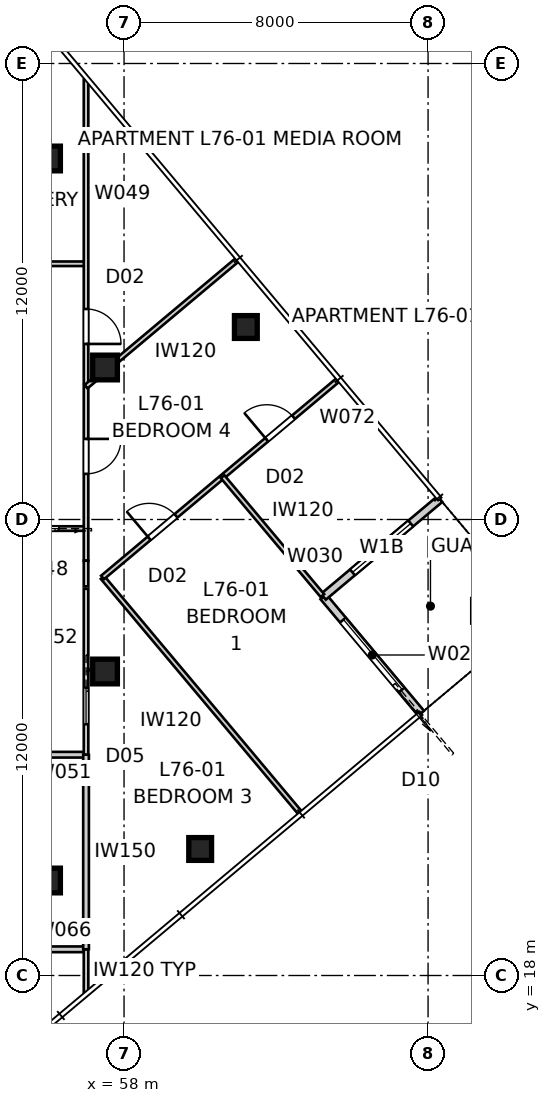
"""IFC4 building model, lengths in metres.
Left out: names, types, materials, properties, quantities, classifications, styles, units other than length and angle.
Written with IfcOpenShell. Run it as: python <this file> out.ifc"""

import sys

from ifc_helpers import new_model, si_unit, direction, frame, frame_2d, origin, origin_2d, place, context, subcontext, project, spatial, rectangle, extrude, element, fill, save


model = new_model("IFC4")
c1 = context("Model", 3, precision=1e-05, world=origin(), true_north=direction((0.0, 1.0)))
c2 = subcontext(c1, "Body", "Model", "MODEL_VIEW")
j1 = project(units=[si_unit("LENGTHUNIT", "METRE"), si_unit("PLANEANGLEUNIT", "RADIAN")], contexts=[c1])
p1 = place(None, origin())
s1 = spatial("IfcSite", under=j1, at=p1, CompositionType="ELEMENT")
p2 = place(p1, origin())
s2 = spatial("IfcBuilding", under=s1, at=p2, CompositionType="ELEMENT")
p3 = place(p2, frame((0.0, 0.0, 276.0)))
s3 = spatial("IfcBuildingStorey", under=s2, at=p3, CompositionType="ELEMENT", Elevation=276.0)
for number, where, z_axis, x_axis in (
    (1, (60.003, 21.329, 0.0), (0.0, 0.0, 1.0), (1.0, 0.0, 0.0)),
    (2, (61.205, 35.065, 0.0), (0.0, 0.0, 1.0), (1.0, 0.0, 0.0)),
):
    element("IfcColumn", number, at=place(p3, frame(where, z_axis=z_axis, x_axis=x_axis)), inside=s3, PredefinedType="COLUMN", context=c2, shape_type="SweptSolid", body=[
        extrude(rectangle(XDim=0.6, YDim=0.6, at=origin_2d()), origin(), (0.0, 0.0, 1.0), 3.4),
    ])
for number, where, z_axis, x_axis in (
    (3, (57.5, 26.0, 0.0), (0.0, 0.0, 1.0), (1.0, 0.0, 0.0)),
    (4, (57.5, 34.0, 0.0), (0.0, 0.0, 1.0), (1.0, 0.0, 0.0)),
    (5, (56.0, 39.5, 0.0), (0.0, 0.0, 1.0), (1.0, 0.0, 0.0)),
    (6, (56.0, 20.5, 0.0), (0.0, 0.0, 1.0), (1.0, 0.0, 0.0)),
):
    element("IfcColumn", number, at=place(p3, frame(where, z_axis=z_axis, x_axis=x_axis)), inside=s3, PredefinedType="COLUMN", context=c2, shape_type="SweptSolid", body=[
        extrude(rectangle(XDim=0.65, YDim=0.65, at=origin_2d()), origin(), (0.0, 0.0, 1.0), 3.4),
    ])
p4 = place(p3, frame((65.817, 24.902, 0.0), z_axis=(0.0, 0.0, 1.0), x_axis=(-0.642768287094, 0.766060656284, 0.0)))
e7 = element("IfcWall", 7, at=p4, inside=s3, PredefinedType="SOLIDWALL", context=c2, shape_type="SweptSolid", body=[
    extrude(rectangle(XDim=4.0, YDim=0.2, at=frame_2d((2.0, 0.0))), origin(), (0.0, 0.0, 1.0), 3.25),
])
p5 = place(p4, frame((0.8, 0.0, 0.0)))
e8 = element("IfcOpeningElement", 8, at=p5, cuts=e7, PredefinedType="OPENING", context=c2, shape_type="SweptSolid", body=[
    extrude(rectangle(XDim=2.4, YDim=2.4, at=frame_2d((1.2, 1.2))), frame((0.0, 0.11, 0.0), z_axis=(0.0, -1.0, 0.0), x_axis=(1.0, 0.0, 0.0)), (0.0, 0.0, 1.0), 0.22),
])
p6 = place(p3, frame((63.246, 27.966, 0.0), z_axis=(0.0, 0.0, 1.0), x_axis=(0.766035437498, 0.642798342015, 0.0)))
e9 = element("IfcWall", 9, at=p6, inside=s3, PredefinedType="SOLIDWALL", context=c2, shape_type="SweptSolid", body=[
    extrude(rectangle(XDim=4.0, YDim=0.2, at=frame_2d((2.0, 0.0))), origin(), (0.0, 0.0, 1.0), 3.25),
])
p7 = place(p6, frame((1.0, 0.0, 0.45)))
e10 = element("IfcOpeningElement", 10, at=p7, cuts=e9, PredefinedType="OPENING", context=c2, shape_type="SweptSolid", body=[
    extrude(rectangle(XDim=2.0, YDim=1.8, at=frame_2d((1.0, 0.9))), frame((0.0, 0.11, 0.0), z_axis=(0.0, -1.0, 0.0), x_axis=(1.0, 0.0, 0.0)), (0.0, 0.0, 1.0), 0.22),
])
p8 = place(p3, frame((52.1, 36.73, 0.0), z_axis=(0.0, 0.0, 1.0), x_axis=(1.0, 0.0, 0.0)))
e11 = element("IfcWall", 11, at=p8, inside=s3, PredefinedType="PARTITIONING", context=c2, shape_type="SweptSolid", body=[
    extrude(rectangle(XDim=4.9, YDim=0.12, at=frame_2d((2.45, 0.0))), origin(), (0.0, 0.0, 1.0), 3.25),
])
p9 = place(p8, frame((1.99, 0.0, 0.0)))
e12 = element("IfcOpeningElement", 12, at=p9, cuts=e11, PredefinedType="OPENING", context=c2, shape_type="SweptSolid", body=[
    extrude(rectangle(XDim=0.92, YDim=2.34, at=frame_2d((0.46, 1.17))), frame((0.0, 0.07, 0.0), z_axis=(0.0, -1.0, 0.0), x_axis=(1.0, 0.0, 0.0)), (0.0, 0.0, 1.0), 0.14),
])
p10 = place(p3, frame((57.0, 29.761, 0.0), z_axis=(0.0, 0.0, 1.0), x_axis=(-1.0, 0.0, 0.0)))
e13 = element("IfcWall", 13, at=p10, inside=s3, PredefinedType="PARTITIONING", context=c2, shape_type="SweptSolid", body=[
    extrude(rectangle(XDim=2.4, YDim=0.12, at=frame_2d((1.2, 0.0))), origin(), (0.0, 0.0, 1.0), 3.25),
])
p11 = place(p10, frame((0.72, 0.0, 0.0)))
e14 = element("IfcOpeningElement", 14, at=p11, cuts=e13, PredefinedType="OPENING", context=c2, shape_type="SweptSolid", body=[
    extrude(rectangle(XDim=0.96, YDim=2.1, at=frame_2d((0.48, 1.05))), frame((0.0, 0.07, 0.0), z_axis=(0.0, -1.0, 0.0), x_axis=(1.0, 0.0, 0.0)), (0.0, 0.0, 1.0), 0.14),
])
p12 = place(p3, frame((57.0, 41.57, 0.0), z_axis=(0.0, 0.0, 1.0), x_axis=(0.0, -1.0, 0.0)))
e15 = element("IfcWall", 15, at=p12, inside=s3, PredefinedType="PARTITIONING", context=c2, shape_type="SweptSolid", body=[
    extrude(rectangle(XDim=12.656, YDim=0.12, at=frame_2d((6.328, 0.0))), origin(), (0.0, 0.0, 1.0), 2.549),
])
p13 = place(p12, frame((9.449, 0.0, 0.0)))
e16 = element("IfcOpeningElement", 16, at=p13, cuts=e15, PredefinedType="OPENING", context=c2, shape_type="SweptSolid", body=[
    extrude(rectangle(XDim=0.92, YDim=2.34, at=frame_2d((0.46, 1.17))), frame((0.0, 0.07, 0.0), z_axis=(0.0, -1.0, 0.0), x_axis=(1.0, 0.0, 0.0)), (0.0, 0.0, 1.0), 0.14),
])
p14 = place(p12, frame((6.031, 0.0, 0.0)))
e17 = element("IfcOpeningElement", 17, at=p14, cuts=e15, PredefinedType="OPENING", context=c2, shape_type="SweptSolid", body=[
    extrude(rectangle(XDim=0.92, YDim=2.34, at=frame_2d((0.46, 1.17))), frame((0.0, 0.07, 0.0), z_axis=(0.0, -1.0, 0.0), x_axis=(1.0, 0.0, 0.0)), (0.0, 0.0, 1.0), 0.14),
])
p15 = place(p3, frame((57.0, 23.81, 0.0), z_axis=(0.0, 0.0, 1.0), x_axis=(-1.0, 0.0, 0.0)))
e18 = element("IfcWall", 18, at=p15, inside=s3, PredefinedType="SOLIDWALL", context=c2, shape_type="SweptSolid", body=[
    extrude(rectangle(XDim=4.9, YDim=0.15, at=frame_2d((2.45, 0.0))), origin(), (0.0, 0.0, 1.0), 3.25),
])
p16 = place(p15, frame((1.97, 0.0, 0.0)))
e19 = element("IfcOpeningElement", 19, at=p16, cuts=e18, PredefinedType="OPENING", context=c2, shape_type="SweptSolid", body=[
    extrude(rectangle(XDim=0.96, YDim=2.1, at=frame_2d((0.48, 1.05))), frame((0.0, 0.085, 0.0), z_axis=(0.0, -1.0, 0.0), x_axis=(1.0, 0.0, 0.0)), (0.0, 0.0, 1.0), 0.17),
])
p17 = place(p3, frame((57.0, 28.176, 0.0), z_axis=(0.0, 0.0, 1.0), x_axis=(0.0, -1.0, 0.0)))
e20 = element("IfcWall", 20, at=p17, inside=s3, PredefinedType="PARTITIONING", context=c2, shape_type="SweptSolid", body=[
    extrude(rectangle(XDim=4.365, YDim=0.12, at=frame_2d((2.183, 0.0))), origin(), (0.0, 0.0, 1.0), 2.549),
])
p18 = place(p17, frame((2.603, 0.0, 0.0)))
e21 = element("IfcOpeningElement", 21, at=p18, cuts=e20, PredefinedType="OPENING", context=c2, shape_type="SweptSolid", body=[
    extrude(rectangle(XDim=0.96, YDim=2.1, at=frame_2d((0.48, 1.05))), frame((0.0, 0.07, 0.0), z_axis=(0.0, -1.0, 0.0), x_axis=(1.0, 0.0, 0.0)), (0.0, 0.0, 1.0), 0.14),
])
p19 = place(p3, frame((51.18, 18.689, 0.0), z_axis=(0.0, 0.0, 1.0), x_axis=(1.0, 0.0, 0.0)))
e22 = element("IfcWall", 22, at=p19, inside=s3, PredefinedType="SOLIDWALL", context=c2, shape_type="SweptSolid", body=[
    extrude(rectangle(XDim=5.82, YDim=0.15, at=frame_2d((2.91, 0.0))), origin(), (0.0, 0.0, 1.0), 3.25),
])
p20 = place(p19, frame((2.91, 0.0, 0.0)))
e23 = element("IfcOpeningElement", 23, at=p20, cuts=e22, PredefinedType="OPENING", context=c2, shape_type="SweptSolid", body=[
    extrude(rectangle(XDim=0.92, YDim=2.1, at=frame_2d((0.46, 1.05))), frame((0.0, 0.085, 0.0), z_axis=(0.0, -1.0, 0.0), x_axis=(1.0, 0.0, 0.0)), (0.0, 0.0, 1.0), 0.17),
])
p21 = place(p3, frame((57.0, 18.689, 0.0), z_axis=(0.0, 0.0, 1.0), x_axis=(0.0, -1.0, 0.0)))
e24 = element("IfcWall", 24, at=p21, inside=s3, PredefinedType="PARTITIONING", context=c2, shape_type="SweptSolid", body=[
    extrude(rectangle(XDim=1.133, YDim=0.12, at=frame_2d((0.567, 0.0))), origin(), (0.0, 0.0, 1.0), 3.25),
])
p22 = place(p3, frame((57.0, 23.81, 0.0), z_axis=(0.0, 0.0, 1.0), x_axis=(0.0, -1.0, 0.0)))
e25 = element("IfcWall", 25, at=p22, inside=s3, PredefinedType="SOLIDWALL", context=c2, shape_type="SweptSolid", body=[
    extrude(rectangle(XDim=5.121, YDim=0.15, at=frame_2d((2.56, 0.0))), origin(), (0.0, 0.0, 1.0), 3.25),
])
p23 = place(p3, frame((62.631, 22.281, 0.0), z_axis=(0.0, 0.0, 1.0), x_axis=(-0.642800378028, 0.766033729027, 0.0)))
e26 = element("IfcWall", 26, at=p23, inside=s3, PredefinedType="PARTITIONING", context=c2, shape_type="SweptSolid", body=[
    extrude(rectangle(XDim=8.085, YDim=0.12, at=frame_2d((4.042, 0.0))), origin(), (0.0, 0.0, 1.0), 3.25),
])
p24 = place(p3, frame((57.434, 28.475, 0.0), z_axis=(0.0, 0.0, 1.0), x_axis=(0.766033729027, 0.642800378028, 0.0)))
e27 = element("IfcWall", 27, at=p24, inside=s3, PredefinedType="PARTITIONING", context=c2, shape_type="SweptSolid", body=[
    extrude(rectangle(XDim=8.085, YDim=0.12, at=frame_2d((4.042, 0.0))), origin(), (0.0, 0.0, 1.0), 3.25),
])
p25 = place(p24, frame((1.603, 0.0, 0.0)))
e28 = element("IfcOpeningElement", 28, at=p25, cuts=e27, PredefinedType="OPENING", context=c2, shape_type="SweptSolid", body=[
    extrude(rectangle(XDim=0.92, YDim=2.34, at=frame_2d((0.46, 1.17))), frame((0.0, 0.07, 0.0), z_axis=(0.0, -1.0, 0.0), x_axis=(1.0, 0.0, 0.0)), (0.0, 0.0, 1.0), 0.14),
])
p26 = place(p24, frame((5.64, 0.0, 0.0)))
e29 = element("IfcOpeningElement", 29, at=p26, cuts=e27, PredefinedType="OPENING", context=c2, shape_type="SweptSolid", body=[
    extrude(rectangle(XDim=0.92, YDim=2.34, at=frame_2d((0.46, 1.17))), frame((0.0, 0.07, 0.0), z_axis=(0.0, -1.0, 0.0), x_axis=(1.0, 0.0, 0.0)), (0.0, 0.0, 1.0), 0.14),
])
p27 = place(p3, frame((60.594, 31.126, 0.0), z_axis=(0.0, 0.0, 1.0), x_axis=(0.642767300664, -0.766061483953, 0.0)))
e30 = element("IfcWall", 30, at=p27, inside=s3, PredefinedType="PARTITIONING", context=c2, shape_type="SweptSolid", body=[
    extrude(rectangle(XDim=4.085, YDim=0.12, at=frame_2d((2.042, 0.0))), origin(), (0.0, 0.0, 1.0), 3.25),
])
p28 = place(p3, frame((57.0, 33.495, 0.0), z_axis=(0.0, 0.0, 1.0), x_axis=(0.76605407051, 0.642776136034, 0.0)))
e31 = element("IfcWall", 31, at=p28, inside=s3, PredefinedType="PARTITIONING", context=c2, shape_type="SweptSolid", body=[
    extrude(rectangle(XDim=5.191, YDim=0.12, at=frame_2d((2.595, 0.0))), origin(), (0.0, 0.0, 1.0), 3.25),
])
p29 = place(p3, frame((57.0, 28.915, 0.0), z_axis=(0.0, 0.0, 1.0), x_axis=(0.0, -1.0, 0.0)))
e32 = element("IfcWall", 32, at=p29, inside=s3, PredefinedType="PARTITIONING", context=c2, shape_type="SweptSolid", body=[
    extrude(rectangle(XDim=0.676, YDim=0.12, at=frame_2d((0.338, 0.0))), origin(), (0.0, 0.0, 1.0), 3.25),
])
p30 = place(p5, origin())
e33 = element("IfcDoor", 33, at=p30, inside=s3, OperationType="SLIDING_TO_LEFT", PredefinedType="DOOR", context=c2, shape_type="SweptSolid", body=[
    extrude(rectangle(XDim=2.4, YDim=2.4, at=frame_2d((1.2, 1.2))), frame((0.0, 0.025, 0.0), z_axis=(0.0, -1.0, 0.0), x_axis=(1.0, 0.0, 0.0)), (0.0, 0.0, 1.0), 0.05),
])
fill(e8, e33)
p31 = place(p7, origin())
e34 = element("IfcWindow", 34, at=p31, inside=s3, PartitioningType="SINGLE_PANEL", PredefinedType="WINDOW", context=c2, shape_type="SweptSolid", body=[
    extrude(rectangle(XDim=2.0, YDim=1.8, at=frame_2d((1.0, 0.9))), frame((0.0, 0.03, 0.0), z_axis=(0.0, -1.0, 0.0), x_axis=(1.0, 0.0, 0.0)), (0.0, 0.0, 1.0), 0.06),
])
fill(e10, e34)
p32 = place(p13, origin())
e35 = element("IfcDoor", 35, at=p32, inside=s3, OperationType="SINGLE_SWING_LEFT", PredefinedType="DOOR", context=c2, shape_type="SweptSolid", body=[
    extrude(rectangle(XDim=0.92, YDim=2.34, at=frame_2d((0.46, 1.17))), frame((0.0, 0.025, 0.0), z_axis=(0.0, -1.0, 0.0), x_axis=(1.0, 0.0, 0.0)), (0.0, 0.0, 1.0), 0.05),
])
fill(e16, e35)
p33 = place(p14, origin())
e36 = element("IfcDoor", 36, at=p33, inside=s3, OperationType="SINGLE_SWING_RIGHT", PredefinedType="DOOR", context=c2, shape_type="SweptSolid", body=[
    extrude(rectangle(XDim=0.92, YDim=2.34, at=frame_2d((0.46, 1.17))), frame((0.0, 0.025, 0.0), z_axis=(0.0, -1.0, 0.0), x_axis=(1.0, 0.0, 0.0)), (0.0, 0.0, 1.0), 0.05),
])
fill(e17, e36)
p34 = place(p11, origin())
e37 = element("IfcDoor", 37, at=p34, inside=s3, OperationType="SLIDING_TO_LEFT", PredefinedType="DOOR", context=c2, shape_type="SweptSolid", body=[
    extrude(rectangle(XDim=0.96, YDim=2.1, at=frame_2d((0.48, 1.05))), frame((0.0, 0.025, 0.0), z_axis=(0.0, -1.0, 0.0), x_axis=(1.0, 0.0, 0.0)), (0.0, 0.0, 1.0), 0.05),
])
fill(e14, e37)
p35 = place(p18, origin())
e38 = element("IfcDoor", 38, at=p35, inside=s3, OperationType="SLIDING_TO_LEFT", PredefinedType="DOOR", context=c2, shape_type="SweptSolid", body=[
    extrude(rectangle(XDim=0.96, YDim=2.1, at=frame_2d((0.48, 1.05))), frame((0.0, 0.025, 0.0), z_axis=(0.0, -1.0, 0.0), x_axis=(1.0, 0.0, 0.0)), (0.0, 0.0, 1.0), 0.05),
])
fill(e21, e38)
p36 = place(p25, origin())
e39 = element("IfcDoor", 39, at=p36, inside=s3, OperationType="SINGLE_SWING_LEFT", PredefinedType="DOOR", context=c2, shape_type="SweptSolid", body=[
    extrude(rectangle(XDim=0.92, YDim=2.34, at=frame_2d((0.46, 1.17))), frame((0.0, 0.025, 0.0), z_axis=(0.0, -1.0, 0.0), x_axis=(1.0, 0.0, 0.0)), (0.0, 0.0, 1.0), 0.05),
])
fill(e28, e39)
p37 = place(p26, origin())
e40 = element("IfcDoor", 40, at=p37, inside=s3, OperationType="SINGLE_SWING_LEFT", PredefinedType="DOOR", context=c2, shape_type="SweptSolid", body=[
    extrude(rectangle(XDim=0.92, YDim=2.34, at=frame_2d((0.46, 1.17))), frame((0.0, 0.025, 0.0), z_axis=(0.0, -1.0, 0.0), x_axis=(1.0, 0.0, 0.0)), (0.0, 0.0, 1.0), 0.05),
])
fill(e29, e40)
save(model, sys.argv[1])
